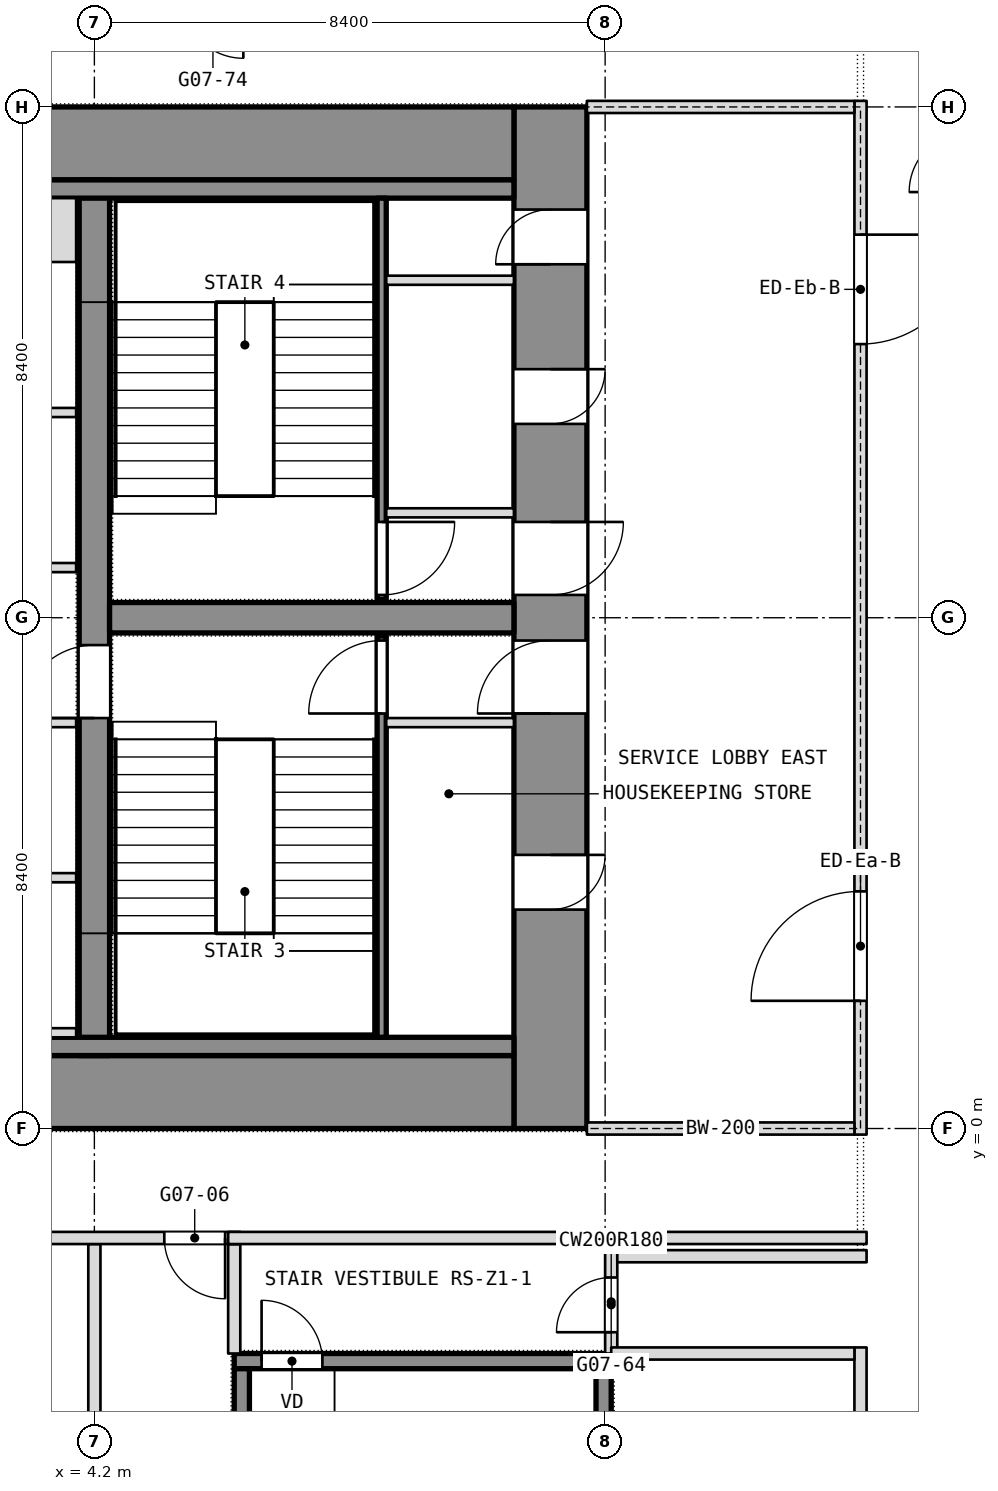
"""IFC4 building model, lengths in metres.
Left out: names, types, materials, properties, quantities, classifications, styles, units other than length and angle.
Written with IfcOpenShell. Run it as: python <this file> out.ifc"""

import sys

from ifc_helpers import new_model, si_unit, direction, frame, frame_2d, origin, place, context, subcontext, project, spatial, rectangle, extrude, element, fill, save


model = new_model("IFC4")
c1 = context("Model", 3, precision=1e-05, world=origin(), true_north=direction((0.0, 1.0)))
c2 = subcontext(c1, "Body", "Model", "MODEL_VIEW")
j1 = project(units=[si_unit("LENGTHUNIT", "METRE"), si_unit("PLANEANGLEUNIT", "RADIAN")], contexts=[c1])
p1 = place(None, origin())
s1 = spatial("IfcSite", under=j1, at=p1, CompositionType="ELEMENT")
p2 = place(p1, origin())
s2 = spatial("IfcBuilding", under=s1, at=p2, CompositionType="ELEMENT")
p3 = place(p2, frame((0.0, 0.0, 83.3)))
s3 = spatial("IfcBuildingStorey", under=s2, at=p3, CompositionType="ELEMENT", Elevation=83.3)
p4 = place(p3, frame((11.7, 0.0, 0.0), z_axis=(0.0, 0.0, 1.0), x_axis=(0.0, 1.0, 0.0)))
e1 = element("IfcWall", 1, at=p4, inside=s3, PredefinedType="SHEAR", context=c2, shape_type="SweptSolid", body=[
    extrude(rectangle(XDim=16.8, YDim=1.2, at=frame_2d((8.4, 0.0))), origin(), (0.0, 0.0, 1.0), 3.6),
])
p5 = place(p4, frame((3.6, 0.0, 0.0)))
e2 = element("IfcOpeningElement", 2, at=p5, cuts=e1, PredefinedType="OPENING", context=c2, shape_type="SweptSolid", body=[
    extrude(rectangle(XDim=0.9, YDim=2.1, at=frame_2d((0.45, 1.05))), frame((0.0, 0.6, 0.0), z_axis=(0.0, -1.0, 0.0), x_axis=(1.0, 0.0, 0.0)), (0.0, 0.0, 1.0), 1.2),
])
p6 = place(p4, frame((6.825, 0.0, 0.0)))
e3 = element("IfcOpeningElement", 3, at=p6, cuts=e1, PredefinedType="OPENING", context=c2, shape_type="SweptSolid", body=[
    extrude(rectangle(XDim=1.2, YDim=2.1, at=frame_2d((0.6, 1.05))), frame((0.0, 0.6, 0.0), z_axis=(0.0, -1.0, 0.0), x_axis=(1.0, 0.0, 0.0)), (0.0, 0.0, 1.0), 1.2),
])
p7 = place(p4, frame((14.212, 0.0, 0.0)))
e4 = element("IfcOpeningElement", 4, at=p7, cuts=e1, PredefinedType="OPENING", context=c2, shape_type="SweptSolid", body=[
    extrude(rectangle(XDim=0.9, YDim=2.1, at=frame_2d((0.45, 1.05))), frame((0.0, 0.6, 0.0), z_axis=(0.0, -1.0, 0.0), x_axis=(1.0, 0.0, 0.0)), (0.0, 0.0, 1.0), 1.2),
])
p8 = place(p4, frame((11.587, 0.0, 0.0)))
e5 = element("IfcOpeningElement", 5, at=p8, cuts=e1, PredefinedType="OPENING", context=c2, shape_type="SweptSolid", body=[
    extrude(rectangle(XDim=0.9, YDim=2.1, at=frame_2d((0.45, 1.05))), frame((0.0, 0.6, 0.0), z_axis=(0.0, -1.0, 0.0), x_axis=(1.0, 0.0, 0.0)), (0.0, 0.0, 1.0), 1.2),
])
p9 = place(p4, frame((8.775, 0.0, 0.0)))
e6 = element("IfcOpeningElement", 6, at=p9, cuts=e1, PredefinedType="OPENING", context=c2, shape_type="SweptSolid", body=[
    extrude(rectangle(XDim=1.2, YDim=2.1, at=frame_2d((0.6, 1.05))), frame((0.0, 0.6, 0.0), z_axis=(0.0, -1.0, 0.0), x_axis=(1.0, 0.0, 0.0)), (0.0, 0.0, 1.0), 1.2),
])
for number, where, z_axis, x_axis in (
    (7, (-11.1, 0.6, 0.0), (0.0, 0.0, 1.0), (1.0, 0.0, 0.0)),
    (8, (-11.1, 16.2, 0.0), (0.0, 0.0, 1.0), (1.0, 0.0, 0.0)),
):
    element("IfcWall", number, at=place(p3, frame(where, z_axis=z_axis, x_axis=x_axis)), inside=s3, PredefinedType="SHEAR", context=c2, shape_type="SweptSolid", body=[
        extrude(rectangle(XDim=22.2, YDim=1.2, at=frame_2d((11.1, 0.0))), origin(), (0.0, 0.0, 1.0), 3.6),
    ])
p10 = place(p3, frame((4.2, 1.2, 0.0), z_axis=(0.0, 0.0, 1.0), x_axis=(0.0, 1.0, 0.0)))
e9 = element("IfcWall", 9, at=p10, inside=s3, PredefinedType="SHEAR", context=c2, shape_type="SweptSolid", body=[
    extrude(rectangle(XDim=14.4, YDim=0.5, at=frame_2d((7.2, 0.0))), origin(), (0.0, 0.0, 1.0), 3.6),
])
p11 = place(p10, frame((5.55, 0.0, 0.0)))
e10 = element("IfcOpeningElement", 10, at=p11, cuts=e9, PredefinedType="OPENING", context=c2, shape_type="SweptSolid", body=[
    extrude(rectangle(XDim=1.2, YDim=2.1, at=frame_2d((0.6, 1.05))), frame((0.0, 0.25, 0.0), z_axis=(0.0, -1.0, 0.0), x_axis=(1.0, 0.0, 0.0)), (0.0, 0.0, 1.0), 0.5),
])
p12 = place(p3, frame((4.45, 8.4, 0.0), z_axis=(0.0, 0.0, 1.0), x_axis=(1.0, 0.0, 0.0)))
e11 = element("IfcWall", 11, at=p12, inside=s3, PredefinedType="SHEAR", context=c2, shape_type="SweptSolid", body=[
    extrude(rectangle(XDim=6.65, YDim=0.5, at=frame_2d((3.325, 0.0))), origin(), (0.0, 0.0, 1.0), 3.6),
])
p13 = place(p3, frame((16.8, -10.9, 0.0), z_axis=(0.0, 0.0, 1.0), x_axis=(0.0, 1.0, 0.0)))
e12 = element("IfcWall", 12, at=p13, inside=s3, PredefinedType="PARTITIONING", context=c2, shape_type="SweptSolid", body=[
    extrude(rectangle(XDim=7.3, YDim=0.2, at=frame_2d((3.65, 0.0))), origin(), (0.0, 0.0, 1.0), 3.3),
])
p14 = place(p13, frame((3.15, 0.0, 0.0)))
e13 = element("IfcOpeningElement", 13, at=p14, cuts=e12, PredefinedType="OPENING", context=c2, shape_type="SweptSolid", body=[
    extrude(rectangle(XDim=1.0, YDim=2.1, at=frame_2d((0.5, 1.05))), frame((0.0, 0.1, 0.0), z_axis=(0.0, -1.0, 0.0), x_axis=(1.0, 0.0, 0.0)), (0.0, 0.0, 1.0), 0.2),
])
p15 = place(p3, frame((12.7, -3.7, 0.0), z_axis=(0.0, 0.0, 1.0), x_axis=(0.0, 1.0, 0.0)))
e14 = element("IfcWall", 14, at=p15, inside=s3, PredefinedType="PARTITIONING", context=c2, shape_type="SweptSolid", body=[
    extrude(rectangle(XDim=1.7, YDim=0.2, at=frame_2d((0.85, 0.0))), origin(), (0.0, 0.0, 1.0), 2.486),
])
p16 = place(p15, frame((0.35, 0.0, 0.0)))
e15 = element("IfcOpeningElement", 15, at=p16, cuts=e14, PredefinedType="OPENING", context=c2, shape_type="SweptSolid", body=[
    extrude(rectangle(XDim=0.9, YDim=2.1, at=frame_2d((0.45, 1.05))), frame((0.0, 0.1, 0.0), z_axis=(0.0, -1.0, 0.0), x_axis=(1.0, 0.0, 0.0)), (0.0, 0.0, 1.0), 0.2),
])
p17 = place(p3, frame((6.5, -3.7, 0.0), z_axis=(0.0, 0.0, 1.0), x_axis=(0.0, 1.0, 0.0)))
e16 = element("IfcWall", 16, at=p17, inside=s3, PredefinedType="PARTITIONING", context=c2, shape_type="SweptSolid", body=[
    extrude(rectangle(XDim=1.8, YDim=0.2, at=frame_2d((0.9, 0.0))), origin(), (0.0, 0.0, 1.0), 3.3),
])
p18 = place(p3, frame((4.2, -10.7, 0.0), z_axis=(0.0, 0.0, 1.0), x_axis=(0.0, 1.0, 0.0)))
e17 = element("IfcWall", 17, at=p18, inside=s3, PredefinedType="PARTITIONING", context=c2, shape_type="SweptSolid", body=[
    extrude(rectangle(XDim=8.8, YDim=0.2, at=frame_2d((4.4, 0.0))), origin(), (0.0, 0.0, 1.0), 2.486),
])
p19 = place(p3, frame((12.7, -3.7, 0.0), z_axis=(0.0, 0.0, 1.0), x_axis=(1.0, 0.0, 0.0)))
e18 = element("IfcWall", 18, at=p19, inside=s3, PredefinedType="PARTITIONING", context=c2, shape_type="SweptSolid", body=[
    extrude(rectangle(XDim=4.0, YDim=0.2, at=frame_2d((2.0, 0.0))), origin(), (0.0, 0.0, 1.0), 3.3),
])
p20 = place(p3, frame((12.8, -2.1, 0.0), z_axis=(0.0, 0.0, 1.0), x_axis=(1.0, 0.0, 0.0)))
e19 = element("IfcWall", 19, at=p20, inside=s3, PredefinedType="PARTITIONING", context=c2, shape_type="SweptSolid", body=[
    extrude(rectangle(XDim=4.1, YDim=0.2, at=frame_2d((2.05, 0.0))), origin(), (0.0, 0.0, 1.0), 3.3),
])
p21 = place(p3, frame((-4.3, -1.8, 0.0), z_axis=(0.0, 0.0, 1.0), x_axis=(1.0, 0.0, 0.0)))
e20 = element("IfcWall", 20, at=p21, inside=s3, PredefinedType="PARTITIONING", context=c2, shape_type="SweptSolid", body=[
    extrude(rectangle(XDim=10.9, YDim=0.2, at=frame_2d((5.45, 0.0))), origin(), (0.0, 0.0, 1.0), 3.3),
])
p22 = place(p21, frame((9.65, 0.0, 0.0)))
e21 = element("IfcOpeningElement", 21, at=p22, cuts=e20, PredefinedType="OPENING", context=c2, shape_type="SweptSolid", body=[
    extrude(rectangle(XDim=1.0, YDim=2.1, at=frame_2d((0.5, 1.05))), frame((0.0, 0.1, 0.0), z_axis=(0.0, -1.0, 0.0), x_axis=(1.0, 0.0, 0.0)), (0.0, 0.0, 1.0), 0.2),
])
p23 = place(p21, frame((3.8, 0.0, 0.0)))
e22 = element("IfcOpeningElement", 22, at=p23, cuts=e20, PredefinedType="OPENING", context=c2, shape_type="SweptSolid", body=[
    extrude(rectangle(XDim=1.0, YDim=2.1, at=frame_2d((0.5, 1.05))), frame((0.0, 0.1, 0.0), z_axis=(0.0, -1.0, 0.0), x_axis=(1.0, 0.0, 0.0)), (0.0, 0.0, 1.0), 0.2),
])
p24 = place(p3, frame((6.4, -1.8, 0.0), z_axis=(0.0, 0.0, 1.0), x_axis=(1.0, 0.0, 0.0)))
e23 = element("IfcWall", 23, at=p24, inside=s3, PredefinedType="PARTITIONING", context=c2, shape_type="SweptSolid", body=[
    extrude(rectangle(XDim=10.5, YDim=0.2, at=frame_2d((5.25, 0.0))), origin(), (0.0, 0.0, 1.0), 3.3),
])
for number, where, z_axis, x_axis in (
    (24, (-11.1, 1.35, 0.0), (0.0, 0.0, 1.0), (1.0, 0.0, 0.0)),
    (25, (-11.1, 15.45, 0.0), (0.0, 0.0, 1.0), (1.0, 0.0, 0.0)),
):
    element("IfcWall", number, at=place(p3, frame(where, z_axis=z_axis, x_axis=x_axis)), inside=s3, PredefinedType="PARTITIONING", context=c2, shape_type="SweptSolid", body=[
        extrude(rectangle(XDim=22.2, YDim=0.3, at=frame_2d((11.1, 0.0))), origin(), (0.0, 0.0, 1.0), 3.3),
    ])
p25 = place(p3, frame((8.925, 1.5, 0.0), z_axis=(0.0, 0.0, 1.0), x_axis=(0.0, 1.0, 0.0)))
e26 = element("IfcWall", 26, at=p25, inside=s3, PredefinedType="SHEAR", context=c2, shape_type="SweptSolid", body=[
    extrude(rectangle(XDim=6.6, YDim=0.15, at=frame_2d((3.3, 0.0))), origin(), (0.0, 0.0, 1.0), 3.3),
])
p26 = place(p25, frame((5.325, 0.0, 0.0)))
e27 = element("IfcOpeningElement", 27, at=p26, cuts=e26, PredefinedType="OPENING", context=c2, shape_type="SweptSolid", body=[
    extrude(rectangle(XDim=1.2, YDim=2.1, at=frame_2d((0.6, 1.05))), frame((0.0, 0.075, 0.0), z_axis=(0.0, -1.0, 0.0), x_axis=(1.0, 0.0, 0.0)), (0.0, 0.0, 1.0), 0.15),
])
p27 = place(p3, frame((9.0, 6.675, 0.0), z_axis=(0.0, 0.0, 1.0), x_axis=(1.0, 0.0, 0.0)))
e28 = element("IfcWall", 28, at=p27, inside=s3, PredefinedType="PARTITIONING", context=c2, shape_type="SweptSolid", body=[
    extrude(rectangle(XDim=2.1, YDim=0.15, at=frame_2d((1.05, 0.0))), origin(), (0.0, 0.0, 1.0), 3.6),
])
p28 = place(p3, frame((8.925, 8.7, 0.0), z_axis=(0.0, 0.0, 1.0), x_axis=(0.0, 1.0, 0.0)))
e29 = element("IfcWall", 29, at=p28, inside=s3, PredefinedType="SHEAR", context=c2, shape_type="SweptSolid", body=[
    extrude(rectangle(XDim=6.6, YDim=0.15, at=frame_2d((3.3, 0.0))), origin(), (0.0, 0.0, 1.0), 3.3),
])
p29 = place(p28, frame((0.075, 0.0, 0.0)))
e30 = element("IfcOpeningElement", 30, at=p29, cuts=e29, PredefinedType="OPENING", context=c2, shape_type="SweptSolid", body=[
    extrude(rectangle(XDim=1.2, YDim=2.1, at=frame_2d((0.6, 1.05))), frame((0.0, 0.075, 0.0), z_axis=(0.0, -1.0, 0.0), x_axis=(1.0, 0.0, 0.0)), (0.0, 0.0, 1.0), 0.15),
])
p30 = place(p3, frame((9.0, 10.125, 0.0), z_axis=(0.0, 0.0, 1.0), x_axis=(1.0, 0.0, 0.0)))
e31 = element("IfcWall", 31, at=p30, inside=s3, PredefinedType="PARTITIONING", context=c2, shape_type="SweptSolid", body=[
    extrude(rectangle(XDim=2.1, YDim=0.15, at=frame_2d((1.05, 0.0))), origin(), (0.0, 0.0, 1.0), 3.6),
])
p31 = place(p3, frame((9.0, 13.95, 0.0), z_axis=(0.0, 0.0, 1.0), x_axis=(1.0, 0.0, 0.0)))
e32 = element("IfcWall", 32, at=p31, inside=s3, PredefinedType="PARTITIONING", context=c2, shape_type="SweptSolid", body=[
    extrude(rectangle(XDim=2.1, YDim=0.15, at=frame_2d((1.05, 0.0))), origin(), (0.0, 0.0, 1.0), 3.3),
])
p32 = place(p3, frame((-3.9, 4.125, 0.0), z_axis=(0.0, 0.0, 1.0), x_axis=(1.0, 0.0, 0.0)))
e33 = element("IfcWall", 33, at=p32, inside=s3, PredefinedType="PARTITIONING", context=c2, shape_type="SweptSolid", body=[
    extrude(rectangle(XDim=7.8, YDim=0.15, at=frame_2d((3.9, 0.0))), origin(), (0.0, 0.0, 1.0), 3.3),
])
p33 = place(p32, frame((3.75, 0.0, 0.0)))
e34 = element("IfcOpeningElement", 34, at=p33, cuts=e33, PredefinedType="OPENING", context=c2, shape_type="SweptSolid", body=[
    extrude(rectangle(XDim=1.2, YDim=2.1, at=frame_2d((0.6, 1.05))), frame((0.0, 0.075, 0.0), z_axis=(0.0, -1.0, 0.0), x_axis=(1.0, 0.0, 0.0)), (0.0, 0.0, 1.0), 0.15),
])
p34 = place(p3, frame((-3.9, 11.775, 0.0), z_axis=(0.0, 0.0, 1.0), x_axis=(1.0, 0.0, 0.0)))
e35 = element("IfcWall", 35, at=p34, inside=s3, PredefinedType="PARTITIONING", context=c2, shape_type="SweptSolid", body=[
    extrude(rectangle(XDim=7.8, YDim=0.15, at=frame_2d((3.9, 0.0))), origin(), (0.0, 0.0, 1.0), 3.3),
])
p35 = place(p34, frame((3.3, 0.0, 0.0)))
e36 = element("IfcOpeningElement", 36, at=p35, cuts=e35, PredefinedType="OPENING", context=c2, shape_type="SweptSolid", body=[
    extrude(rectangle(XDim=1.2, YDim=2.1, at=frame_2d((0.6, 1.05))), frame((0.0, 0.075, 0.0), z_axis=(0.0, -1.0, 0.0), x_axis=(1.0, 0.0, 0.0)), (0.0, 0.0, 1.0), 0.15),
])
p36 = place(p3, frame((1.65, 1.575, 0.0), z_axis=(0.0, 0.0, 1.0), x_axis=(1.0, 0.0, 0.0)))
e37 = element("IfcWall", 37, at=p36, inside=s3, PredefinedType="SHEAR", context=c2, shape_type="SweptSolid", body=[
    extrude(rectangle(XDim=2.25, YDim=0.15, at=frame_2d((1.125, 0.0))), origin(), (0.0, 0.0, 1.0), 3.6),
])
p37 = place(p3, frame((1.65, 14.775, 0.0), z_axis=(0.0, 0.0, 1.0), x_axis=(1.0, 0.0, 0.0)))
e38 = element("IfcWall", 38, at=p37, inside=s3, PredefinedType="SHEAR", context=c2, shape_type="SweptSolid", body=[
    extrude(rectangle(XDim=2.25, YDim=1.05, at=frame_2d((1.125, 0.0))), origin(), (0.0, 0.0, 1.0), 3.6),
])
for number, where, z_axis, x_axis in (
    (39, (1.65, 6.675, 0.0), (0.0, 0.0, 1.0), (1.0, 0.0, 0.0)),
    (40, (1.65, 9.225, 0.0), (0.0, 0.0, 1.0), (1.0, 0.0, 0.0)),
):
    element("IfcWall", number, at=place(p3, frame(where, z_axis=z_axis, x_axis=x_axis)), inside=s3, PredefinedType="SHEAR", context=c2, shape_type="SweptSolid", body=[
        extrude(rectangle(XDim=2.25, YDim=0.15, at=frame_2d((1.125, 0.0))), origin(), (0.0, 0.0, 1.0), 3.6),
    ])
p38 = place(p3, frame((16.8, -0.1, 0.0), z_axis=(0.0, 0.0, 1.0), x_axis=(0.0, 1.0, 0.0)))
e41 = element("IfcWall", 41, at=p38, inside=s3, PredefinedType="PARTITIONING", context=c2, shape_type="SweptSolid", body=[
    extrude(rectangle(XDim=17.0, YDim=0.2, at=frame_2d((8.5, 0.0))), origin(), (0.0, 0.0, 1.0), 3.3),
])
p39 = place(p38, frame((2.2, 0.0, 0.0)))
e42 = element("IfcOpeningElement", 42, at=p39, cuts=e41, PredefinedType="OPENING", context=c2, shape_type="SweptSolid", body=[
    extrude(rectangle(XDim=1.8, YDim=2.1, at=frame_2d((0.9, 1.05))), frame((0.0, 0.1, 0.0), z_axis=(0.0, -1.0, 0.0), x_axis=(1.0, 0.0, 0.0)), (0.0, 0.0, 1.0), 0.2),
])
p40 = place(p38, frame((13.0, 0.0, 0.0)))
e43 = element("IfcOpeningElement", 43, at=p40, cuts=e41, PredefinedType="OPENING", context=c2, shape_type="SweptSolid", body=[
    extrude(rectangle(XDim=1.8, YDim=2.1, at=frame_2d((0.9, 1.05))), frame((0.0, 0.1, 0.0), z_axis=(0.0, -1.0, 0.0), x_axis=(1.0, 0.0, 0.0)), (0.0, 0.0, 1.0), 0.2),
])
for number, where, z_axis, x_axis in (
    (44, (12.3, 0.0, 0.0), (0.0, 0.0, 1.0), (1.0, 0.0, 0.0)),
    (45, (12.3, 16.8, 0.0), (0.0, 0.0, 1.0), (1.0, 0.0, 0.0)),
):
    element("IfcWall", number, at=place(p3, frame(where, z_axis=z_axis, x_axis=x_axis)), inside=s3, PredefinedType="PARTITIONING", context=c2, shape_type="SweptSolid", body=[
        extrude(rectangle(XDim=4.4, YDim=0.2, at=frame_2d((2.2, 0.0))), origin(), (0.0, 0.0, 1.0), 2.8),
    ])
p41 = place(p3, frame((6.5, -3.825, 0.1), z_axis=(0.0, 0.0, 1.0), x_axis=(1.0, 0.0, 0.0)))
e46 = element("IfcWall", 46, at=p41, inside=s3, PredefinedType="SHEAR", context=c2, shape_type="SweptSolid", body=[
    extrude(rectangle(XDim=6.2, YDim=0.25, at=frame_2d((3.1, 0.0))), origin(), (0.0, 0.0, 1.0), 3.2),
])
p42 = place(p41, frame((0.45, 0.0, 0.0)))
e47 = element("IfcOpeningElement", 47, at=p42, cuts=e46, PredefinedType="OPENING", context=c2, shape_type="SweptSolid", body=[
    extrude(rectangle(XDim=1.0, YDim=2.1, at=frame_2d((0.5, 1.05))), frame((0.0, 0.125, 0.0), z_axis=(0.0, -1.0, 0.0), x_axis=(1.0, 0.0, 0.0)), (0.0, 0.0, 1.0), 0.25),
])
for number, where, z_axis, x_axis in (
    (48, (6.625, -6.85, 0.1), (0.0, 0.0, 1.0), (0.0, 1.0, 0.0)),
    (49, (12.575, -6.85, 0.1), (0.0, 0.0, 1.0), (0.0, 1.0, 0.0)),
):
    element("IfcWall", number, at=place(p3, frame(where, z_axis=z_axis, x_axis=x_axis)), inside=s3, PredefinedType="SHEAR", context=c2, shape_type="SweptSolid", body=[
        extrude(rectangle(XDim=2.9, YDim=0.25, at=frame_2d((1.45, 0.0))), origin(), (0.0, 0.0, 1.0), 3.2),
    ])
p43 = place(p16, origin())
e50 = element("IfcDoor", 50, at=p43, inside=s3, OperationType="SINGLE_SWING_LEFT", PredefinedType="DOOR", context=c2, shape_type="SweptSolid", body=[
    extrude(rectangle(XDim=0.9, YDim=2.1, at=frame_2d((0.45, 1.05))), frame((0.0, 0.025, 0.0), z_axis=(0.0, -1.0, 0.0), x_axis=(1.0, 0.0, 0.0)), (0.0, 0.0, 1.0), 0.05),
])
fill(e15, e50)
p44 = place(p22, origin())
e51 = element("IfcDoor", 51, at=p44, inside=s3, OperationType="SINGLE_SWING_LEFT", PredefinedType="DOOR", context=c2, shape_type="SweptSolid", body=[
    extrude(rectangle(XDim=1.0, YDim=2.1, at=frame_2d((0.5, 1.05))), frame((0.0, 0.025, 0.0), z_axis=(0.0, -1.0, 0.0), x_axis=(1.0, 0.0, 0.0)), (0.0, 0.0, 1.0), 0.05),
])
fill(e21, e51)
p45 = place(p42, origin())
e52 = element("IfcDoor", 52, at=p45, inside=s3, OperationType="SINGLE_SWING_LEFT", PredefinedType="DOOR", context=c2, shape_type="SweptSolid", body=[
    extrude(rectangle(XDim=1.0, YDim=2.1, at=frame_2d((0.5, 1.05))), frame((0.0, 0.025, 0.0), z_axis=(0.0, -1.0, 0.0), x_axis=(1.0, 0.0, 0.0)), (0.0, 0.0, 1.0), 0.05),
])
fill(e47, e52)
p46 = place(p5, origin())
e53 = element("IfcDoor", 53, at=p46, inside=s3, OperationType="SINGLE_SWING_LEFT", PredefinedType="DOOR", context=c2, shape_type="SweptSolid", body=[
    extrude(rectangle(XDim=0.9, YDim=2.1, at=frame_2d((0.45, 1.05))), frame((0.0, 0.025, 0.0), z_axis=(0.0, -1.0, 0.0), x_axis=(1.0, 0.0, 0.0)), (0.0, 0.0, 1.0), 0.05),
])
fill(e2, e53)
p47 = place(p6, origin())
e54 = element("IfcDoor", 54, at=p47, inside=s3, OperationType="SINGLE_SWING_LEFT", PredefinedType="DOOR", context=c2, shape_type="SweptSolid", body=[
    extrude(rectangle(XDim=1.2, YDim=2.1, at=frame_2d((0.6, 1.05))), frame((0.0, 0.025, 0.0), z_axis=(0.0, -1.0, 0.0), x_axis=(1.0, 0.0, 0.0)), (0.0, 0.0, 1.0), 0.05),
])
fill(e3, e54)
p48 = place(p26, origin())
e55 = element("IfcDoor", 55, at=p48, inside=s3, OperationType="SINGLE_SWING_LEFT", PredefinedType="DOOR", context=c2, shape_type="SweptSolid", body=[
    extrude(rectangle(XDim=1.2, YDim=2.1, at=frame_2d((0.6, 1.05))), frame((0.0, 0.025, 0.0), z_axis=(0.0, -1.0, 0.0), x_axis=(1.0, 0.0, 0.0)), (0.0, 0.0, 1.0), 0.05),
])
fill(e27, e55)
p49 = place(p7, origin())
e56 = element("IfcDoor", 56, at=p49, inside=s3, OperationType="SINGLE_SWING_LEFT", PredefinedType="DOOR", context=c2, shape_type="SweptSolid", body=[
    extrude(rectangle(XDim=0.9, YDim=2.1, at=frame_2d((0.45, 1.05))), frame((0.0, 0.025, 0.0), z_axis=(0.0, -1.0, 0.0), x_axis=(1.0, 0.0, 0.0)), (0.0, 0.0, 1.0), 0.05),
])
fill(e4, e56)
p50 = place(p8, origin())
e57 = element("IfcDoor", 57, at=p50, inside=s3, OperationType="SINGLE_SWING_LEFT", PredefinedType="DOOR", context=c2, shape_type="SweptSolid", body=[
    extrude(rectangle(XDim=0.9, YDim=2.1, at=frame_2d((0.45, 1.05))), frame((0.0, 0.025, 0.0), z_axis=(0.0, -1.0, 0.0), x_axis=(1.0, 0.0, 0.0)), (0.0, 0.0, 1.0), 0.05),
])
fill(e5, e57)
p51 = place(p9, origin())
e58 = element("IfcDoor", 58, at=p51, inside=s3, OperationType="SINGLE_SWING_LEFT", PredefinedType="DOOR", context=c2, shape_type="SweptSolid", body=[
    extrude(rectangle(XDim=1.2, YDim=2.1, at=frame_2d((0.6, 1.05))), frame((0.0, 0.025, 0.0), z_axis=(0.0, -1.0, 0.0), x_axis=(1.0, 0.0, 0.0)), (0.0, 0.0, 1.0), 0.05),
])
fill(e6, e58)
p52 = place(p29, origin())
e59 = element("IfcDoor", 59, at=p52, inside=s3, OperationType="SINGLE_SWING_LEFT", PredefinedType="DOOR", context=c2, shape_type="SweptSolid", body=[
    extrude(rectangle(XDim=1.2, YDim=2.1, at=frame_2d((0.6, 1.05))), frame((0.0, 0.025, 0.0), z_axis=(0.0, -1.0, 0.0), x_axis=(1.0, 0.0, 0.0)), (0.0, 0.0, 1.0), 0.05),
])
fill(e30, e59)
p53 = place(p11, origin())
e60 = element("IfcDoor", 60, at=p53, inside=s3, OperationType="SINGLE_SWING_LEFT", PredefinedType="DOOR", context=c2, shape_type="SweptSolid", body=[
    extrude(rectangle(XDim=1.2, YDim=2.1, at=frame_2d((0.6, 1.05))), frame((0.0, 0.025, 0.0), z_axis=(0.0, -1.0, 0.0), x_axis=(1.0, 0.0, 0.0)), (0.0, 0.0, 1.0), 0.05),
])
fill(e10, e60)
p54 = place(p39, origin())
e61 = element("IfcDoor", 61, at=p54, inside=s3, OperationType="DOUBLE_DOOR_SINGLE_SWING", PredefinedType="DOOR", context=c2, shape_type="SweptSolid", body=[
    extrude(rectangle(XDim=1.8, YDim=2.1, at=frame_2d((0.9, 1.05))), frame((0.0, 0.025, 0.0), z_axis=(0.0, -1.0, 0.0), x_axis=(1.0, 0.0, 0.0)), (0.0, 0.0, 1.0), 0.05),
])
fill(e42, e61)
p55 = place(p40, origin())
e62 = element("IfcDoor", 62, at=p55, inside=s3, OperationType="DOUBLE_DOOR_SINGLE_SWING", PredefinedType="DOOR", context=c2, shape_type="SweptSolid", body=[
    extrude(rectangle(XDim=1.8, YDim=2.1, at=frame_2d((0.9, 1.05))), frame((0.0, 0.025, 0.0), z_axis=(0.0, -1.0, 0.0), x_axis=(1.0, 0.0, 0.0)), (0.0, 0.0, 1.0), 0.05),
])
fill(e43, e62)
save(model, sys.argv[1])
